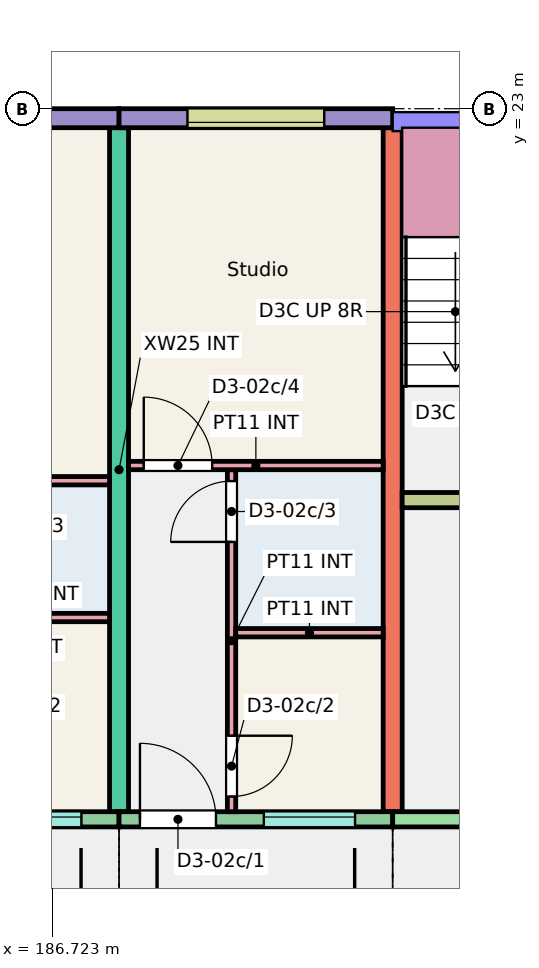
"""IFC4 building model, lengths in metres.
Left out: names, types, materials, properties, quantities, classifications, styles, units other than length and angle.
Written with IfcOpenShell. Run it as: python <this file> out.ifc"""

import sys

from ifc_helpers import new_model, si_unit, direction, frame, frame_2d, origin, place, context, subcontext, project, spatial, rectangle, extrude, element, fill, save


model = new_model("IFC4")
c1 = context("Model", 3, precision=1e-05, world=origin(), true_north=direction((0.0, 1.0)))
c2 = subcontext(c1, "Body", "Model", "MODEL_VIEW")
j1 = project(units=[si_unit("LENGTHUNIT", "METRE"), si_unit("PLANEANGLEUNIT", "RADIAN")], contexts=[c1])
p1 = place(None, origin())
s1 = spatial("IfcSite", under=j1, at=p1, CompositionType="ELEMENT")
p2 = place(p1, origin())
s2 = spatial("IfcBuilding", under=s1, at=p2, CompositionType="ELEMENT")
p3 = place(p2, frame((0.0, 0.0, 6.0)))
s3 = spatial("IfcBuildingStorey", under=s2, at=p3, CompositionType="ELEMENT", Elevation=6.0)
for number, where, z_axis, x_axis in (
    (1, (187.6, 13.75, 0.0), (0.0, 0.0, 1.0), (0.0, 1.0, 0.0)),
    (2, (191.2, 13.75, 0.0), (0.0, 0.0, 1.0), (0.0, 1.0, 0.0)),
):
    element("IfcWall", number, at=place(p3, frame(where, z_axis=z_axis, x_axis=x_axis)), inside=s3, PredefinedType="SHEAR", context=c2, shape_type="SweptSolid", body=[
        extrude(rectangle(XDim=9.0, YDim=0.25, at=frame_2d((4.5, 0.0))), origin(), (0.0, 0.0, 1.0), 3.0),
    ])
p4 = place(p3, frame((184.0, 22.875, 0.0), z_axis=(0.0, 0.0, 1.0), x_axis=(1.0, 0.0, 0.0)))
e3 = element("IfcWall", 3, at=p4, inside=s3, PredefinedType="SOLIDWALL", context=c2, shape_type="SweptSolid", body=[
    extrude(rectangle(XDim=3.6, YDim=0.25, at=frame_2d((1.8, 0.0))), origin(), (0.0, 0.0, 1.0), 3.0),
])
p5 = place(p4, frame((0.9, 0.0, 1.1)))
e4 = element("IfcOpeningElement", 4, at=p5, cuts=e3, PredefinedType="OPENING", context=c2, shape_type="SweptSolid", body=[
    extrude(rectangle(XDim=1.8, YDim=1.3, at=frame_2d((0.9, 0.65))), frame((0.0, 0.135, 0.0), z_axis=(0.0, -1.0, 0.0), x_axis=(1.0, 0.0, 0.0)), (0.0, 0.0, 1.0), 0.27),
])
p6 = place(p3, frame((184.0, 13.65, 0.0), z_axis=(0.0, 0.0, 1.0), x_axis=(1.0, 0.0, 0.0)))
e5 = element("IfcWall", 5, at=p6, inside=s3, PredefinedType="SOLIDWALL", context=c2, shape_type="SweptSolid", body=[
    extrude(rectangle(XDim=3.6, YDim=0.2, at=frame_2d((1.8, 0.0))), origin(), (0.0, 0.0, 1.0), 3.0),
])
p7 = place(p6, frame((1.905, 0.0, 1.1)))
e6 = element("IfcOpeningElement", 6, at=p7, cuts=e5, PredefinedType="OPENING", context=c2, shape_type="SweptSolid", body=[
    extrude(rectangle(XDim=1.2, YDim=1.3, at=frame_2d((0.6, 0.65))), frame((0.0, 0.11, 0.0), z_axis=(0.0, -1.0, 0.0), x_axis=(1.0, 0.0, 0.0)), (0.0, 0.0, 1.0), 0.22),
])
p8 = place(p6, frame((0.275, 0.0, 0.0)))
e7 = element("IfcOpeningElement", 7, at=p8, cuts=e5, PredefinedType="OPENING", context=c2, shape_type="SweptSolid", body=[
    extrude(rectangle(XDim=1.0, YDim=2.1, at=frame_2d((0.5, 1.05))), frame((0.0, 0.11, 0.0), z_axis=(0.0, -1.0, 0.0), x_axis=(1.0, 0.0, 0.0)), (0.0, 0.0, 1.0), 0.22),
])
p9 = place(p3, frame((187.6, 22.875, 0.0), z_axis=(0.0, 0.0, 1.0), x_axis=(1.0, 0.0, 0.0)))
e8 = element("IfcWall", 8, at=p9, inside=s3, PredefinedType="SOLIDWALL", context=c2, shape_type="SweptSolid", body=[
    extrude(rectangle(XDim=3.6, YDim=0.25, at=frame_2d((1.8, 0.0))), origin(), (0.0, 0.0, 1.0), 3.0),
])
p10 = place(p9, frame((0.9, 0.0, 1.1)))
e9 = element("IfcOpeningElement", 9, at=p10, cuts=e8, PredefinedType="OPENING", context=c2, shape_type="SweptSolid", body=[
    extrude(rectangle(XDim=1.8, YDim=1.3, at=frame_2d((0.9, 0.65))), frame((0.0, 0.135, 0.0), z_axis=(0.0, -1.0, 0.0), x_axis=(1.0, 0.0, 0.0)), (0.0, 0.0, 1.0), 0.27),
])
p11 = place(p3, frame((187.6, 13.65, 0.0), z_axis=(0.0, 0.0, 1.0), x_axis=(1.0, 0.0, 0.0)))
e10 = element("IfcWall", 10, at=p11, inside=s3, PredefinedType="SOLIDWALL", context=c2, shape_type="SweptSolid", body=[
    extrude(rectangle(XDim=3.6, YDim=0.2, at=frame_2d((1.8, 0.0))), origin(), (0.0, 0.0, 1.0), 3.0),
])
p12 = place(p11, frame((1.905, 0.0, 1.1)))
e11 = element("IfcOpeningElement", 11, at=p12, cuts=e10, PredefinedType="OPENING", context=c2, shape_type="SweptSolid", body=[
    extrude(rectangle(XDim=1.2, YDim=1.3, at=frame_2d((0.6, 0.65))), frame((0.0, 0.11, 0.0), z_axis=(0.0, -1.0, 0.0), x_axis=(1.0, 0.0, 0.0)), (0.0, 0.0, 1.0), 0.22),
])
p13 = place(p11, frame((0.275, 0.0, 0.0)))
e12 = element("IfcOpeningElement", 12, at=p13, cuts=e10, PredefinedType="OPENING", context=c2, shape_type="SweptSolid", body=[
    extrude(rectangle(XDim=1.0, YDim=2.1, at=frame_2d((0.5, 1.05))), frame((0.0, 0.11, 0.0), z_axis=(0.0, -1.0, 0.0), x_axis=(1.0, 0.0, 0.0)), (0.0, 0.0, 1.0), 0.22),
])
p14 = place(p3, frame((191.2, 13.65, 0.0), z_axis=(0.0, 0.0, 1.0), x_axis=(1.0, 0.0, 0.0)))
e13 = element("IfcWall", 13, at=p14, inside=s3, PredefinedType="SHEAR", context=c2, shape_type="SweptSolid", body=[
    extrude(rectangle(XDim=5.85, YDim=0.2, at=frame_2d((2.925, 0.0))), origin(), (0.0, 0.0, 1.0), 3.0),
])
p15 = place(p14, frame((2.438, 0.0, 0.0)))
e14 = element("IfcOpeningElement", 14, at=p15, cuts=e13, PredefinedType="OPENING", context=c2, shape_type="SweptSolid", body=[
    extrude(rectangle(XDim=1.1, YDim=2.1, at=frame_2d((0.55, 1.05))), frame((0.0, 0.11, 0.0), z_axis=(0.0, -1.0, 0.0), x_axis=(1.0, 0.0, 0.0)), (0.0, 0.0, 1.0), 0.22),
])
p16 = place(p3, frame((191.325, 17.85, 0.0), z_axis=(0.0, 0.0, 1.0), x_axis=(1.0, 0.0, 0.0)))
e15 = element("IfcWall", 15, at=p16, inside=s3, PredefinedType="SHEAR", context=c2, shape_type="SweptSolid", body=[
    extrude(rectangle(XDim=5.725, YDim=0.2, at=frame_2d((2.863, 0.0))), origin(), (0.0, 0.0, 1.0), 3.0),
])
p17 = place(p16, frame((0.95, 0.0, 0.0)))
e16 = element("IfcOpeningElement", 16, at=p17, cuts=e15, PredefinedType="OPENING", context=c2, shape_type="SweptSolid", body=[
    extrude(rectangle(XDim=1.0, YDim=2.1, at=frame_2d((0.5, 1.05))), frame((0.0, 0.11, 0.0), z_axis=(0.0, -1.0, 0.0), x_axis=(1.0, 0.0, 0.0)), (0.0, 0.0, 1.0), 0.22),
])
p18 = place(p16, frame((3.863, 0.0, 0.0)))
e17 = element("IfcOpeningElement", 17, at=p18, cuts=e15, PredefinedType="OPENING", context=c2, shape_type="SweptSolid", body=[
    extrude(rectangle(XDim=1.1, YDim=2.1, at=frame_2d((0.55, 1.05))), frame((0.0, 0.11, 0.0), z_axis=(0.0, -1.0, 0.0), x_axis=(1.0, 0.0, 0.0)), (0.0, 0.0, 1.0), 0.22),
])
p19 = place(p3, frame((185.535, 16.305, 0.0), z_axis=(0.0, 0.0, 1.0), x_axis=(1.0, 0.0, 0.0)))
e18 = element("IfcWall", 18, at=p19, inside=s3, PredefinedType="PARTITIONING", context=c2, shape_type="SweptSolid", body=[
    extrude(rectangle(XDim=1.94, YDim=0.11, at=frame_2d((0.97, 0.0))), origin(), (0.0, 0.0, 1.0), 2.8),
])
p20 = place(p3, frame((184.125, 18.105, 0.0), z_axis=(0.0, 0.0, 1.0), x_axis=(1.0, 0.0, 0.0)))
e19 = element("IfcWall", 19, at=p20, inside=s3, PredefinedType="PARTITIONING", context=c2, shape_type="SweptSolid", body=[
    extrude(rectangle(XDim=3.35, YDim=0.11, at=frame_2d((1.675, 0.0))), origin(), (0.0, 0.0, 1.0), 2.8),
])
p21 = place(p20, frame((0.2, 0.0, 0.0)))
e20 = element("IfcOpeningElement", 20, at=p21, cuts=e19, PredefinedType="OPENING", context=c2, shape_type="SweptSolid", body=[
    extrude(rectangle(XDim=0.9, YDim=2.1, at=frame_2d((0.45, 1.05))), frame((0.0, 0.065, 0.0), z_axis=(0.0, -1.0, 0.0), x_axis=(1.0, 0.0, 0.0)), (0.0, 0.0, 1.0), 0.13),
])
p22 = place(p3, frame((189.08, 13.75, 0.0), z_axis=(0.0, 0.0, 1.0), x_axis=(0.0, 1.0, 0.0)))
e21 = element("IfcWall", 21, at=p22, inside=s3, PredefinedType="PARTITIONING", context=c2, shape_type="SweptSolid", body=[
    extrude(rectangle(XDim=4.5, YDim=0.11, at=frame_2d((2.25, 0.0))), origin(), (0.0, 0.0, 1.0), 2.8),
])
p23 = place(p22, frame((0.2, 0.0, 0.0)))
e22 = element("IfcOpeningElement", 22, at=p23, cuts=e21, PredefinedType="OPENING", context=c2, shape_type="SweptSolid", body=[
    extrude(rectangle(XDim=0.8, YDim=2.1, at=frame_2d((0.4, 1.05))), frame((0.0, 0.065, 0.0), z_axis=(0.0, -1.0, 0.0), x_axis=(1.0, 0.0, 0.0)), (0.0, 0.0, 1.0), 0.13),
])
p24 = place(p22, frame((3.55, 0.0, 0.0)))
e23 = element("IfcOpeningElement", 23, at=p24, cuts=e21, PredefinedType="OPENING", context=c2, shape_type="SweptSolid", body=[
    extrude(rectangle(XDim=0.8, YDim=2.1, at=frame_2d((0.4, 1.05))), frame((0.0, 0.065, 0.0), z_axis=(0.0, -1.0, 0.0), x_axis=(1.0, 0.0, 0.0)), (0.0, 0.0, 1.0), 0.13),
])
p25 = place(p3, frame((189.135, 16.105, 0.0), z_axis=(0.0, 0.0, 1.0), x_axis=(1.0, 0.0, 0.0)))
e24 = element("IfcWall", 24, at=p25, inside=s3, PredefinedType="PARTITIONING", context=c2, shape_type="SweptSolid", body=[
    extrude(rectangle(XDim=1.94, YDim=0.11, at=frame_2d((0.97, 0.0))), origin(), (0.0, 0.0, 1.0), 2.8),
])
p26 = place(p3, frame((187.725, 18.305, 0.0), z_axis=(0.0, 0.0, 1.0), x_axis=(1.0, 0.0, 0.0)))
e25 = element("IfcWall", 25, at=p26, inside=s3, PredefinedType="PARTITIONING", context=c2, shape_type="SweptSolid", body=[
    extrude(rectangle(XDim=3.35, YDim=0.11, at=frame_2d((1.675, 0.0))), origin(), (0.0, 0.0, 1.0), 2.8),
])
p27 = place(p26, frame((0.2, 0.0, 0.0)))
e26 = element("IfcOpeningElement", 26, at=p27, cuts=e25, PredefinedType="OPENING", context=c2, shape_type="SweptSolid", body=[
    extrude(rectangle(XDim=0.9, YDim=2.1, at=frame_2d((0.45, 1.05))), frame((0.0, 0.065, 0.0), z_axis=(0.0, -1.0, 0.0), x_axis=(1.0, 0.0, 0.0)), (0.0, 0.0, 1.0), 0.13),
])
p28 = place(p7, origin())
e27 = element("IfcWindow", 27, at=p28, inside=s3, PartitioningType="SINGLE_PANEL", PredefinedType="WINDOW", context=c2, shape_type="SweptSolid", body=[
    extrude(rectangle(XDim=1.2, YDim=1.3, at=frame_2d((0.6, 0.65))), frame((0.0, 0.06, 0.0), z_axis=(0.0, -1.0, 0.0), x_axis=(1.0, 0.0, 0.0)), (0.0, 0.0, 1.0), 0.06),
])
fill(e6, e27)
p29 = place(p12, origin())
e28 = element("IfcWindow", 28, at=p29, inside=s3, PartitioningType="SINGLE_PANEL", PredefinedType="WINDOW", context=c2, shape_type="SweptSolid", body=[
    extrude(rectangle(XDim=1.2, YDim=1.3, at=frame_2d((0.6, 0.65))), frame((0.0, 0.06, 0.0), z_axis=(0.0, -1.0, 0.0), x_axis=(1.0, 0.0, 0.0)), (0.0, 0.0, 1.0), 0.06),
])
fill(e11, e28)
p30 = place(p10, origin())
e29 = element("IfcWindow", 29, at=p30, inside=s3, PartitioningType="SINGLE_PANEL", PredefinedType="WINDOW", context=c2, shape_type="SweptSolid", body=[
    extrude(rectangle(XDim=1.8, YDim=1.3, at=frame_2d((0.9, 0.65))), frame((0.0, -0.025, 0.0), z_axis=(0.0, -1.0, 0.0), x_axis=(1.0, 0.0, 0.0)), (0.0, 0.0, 1.0), 0.06),
])
fill(e9, e29)
p31 = place(p13, origin())
e30 = element("IfcDoor", 30, at=p31, inside=s3, OperationType="SINGLE_SWING_LEFT", PredefinedType="DOOR", context=c2, shape_type="SweptSolid", body=[
    extrude(rectangle(XDim=1.0, YDim=2.1, at=frame_2d((0.5, 1.05))), frame((0.0, 0.025, 0.0), z_axis=(0.0, -1.0, 0.0), x_axis=(1.0, 0.0, 0.0)), (0.0, 0.0, 1.0), 0.05),
])
fill(e12, e30)
p32 = place(p23, origin())
e31 = element("IfcDoor", 31, at=p32, inside=s3, OperationType="SINGLE_SWING_RIGHT", PredefinedType="DOOR", context=c2, shape_type="SweptSolid", body=[
    extrude(rectangle(XDim=0.8, YDim=2.1, at=frame_2d((0.4, 1.05))), frame((0.0, 0.025, 0.0), z_axis=(0.0, -1.0, 0.0), x_axis=(1.0, 0.0, 0.0)), (0.0, 0.0, 1.0), 0.05),
])
fill(e22, e31)
p33 = place(p24, origin())
e32 = element("IfcDoor", 32, at=p33, inside=s3, OperationType="SINGLE_SWING_LEFT", PredefinedType="DOOR", context=c2, shape_type="SweptSolid", body=[
    extrude(rectangle(XDim=0.8, YDim=2.1, at=frame_2d((0.4, 1.05))), frame((0.0, 0.025, 0.0), z_axis=(0.0, -1.0, 0.0), x_axis=(1.0, 0.0, 0.0)), (0.0, 0.0, 1.0), 0.05),
])
fill(e23, e32)
p34 = place(p27, origin())
e33 = element("IfcDoor", 33, at=p34, inside=s3, OperationType="SINGLE_SWING_LEFT", PredefinedType="DOOR", context=c2, shape_type="SweptSolid", body=[
    extrude(rectangle(XDim=0.9, YDim=2.1, at=frame_2d((0.45, 1.05))), frame((0.0, 0.025, 0.0), z_axis=(0.0, -1.0, 0.0), x_axis=(1.0, 0.0, 0.0)), (0.0, 0.0, 1.0), 0.05),
])
fill(e26, e33)
save(model, sys.argv[1])
